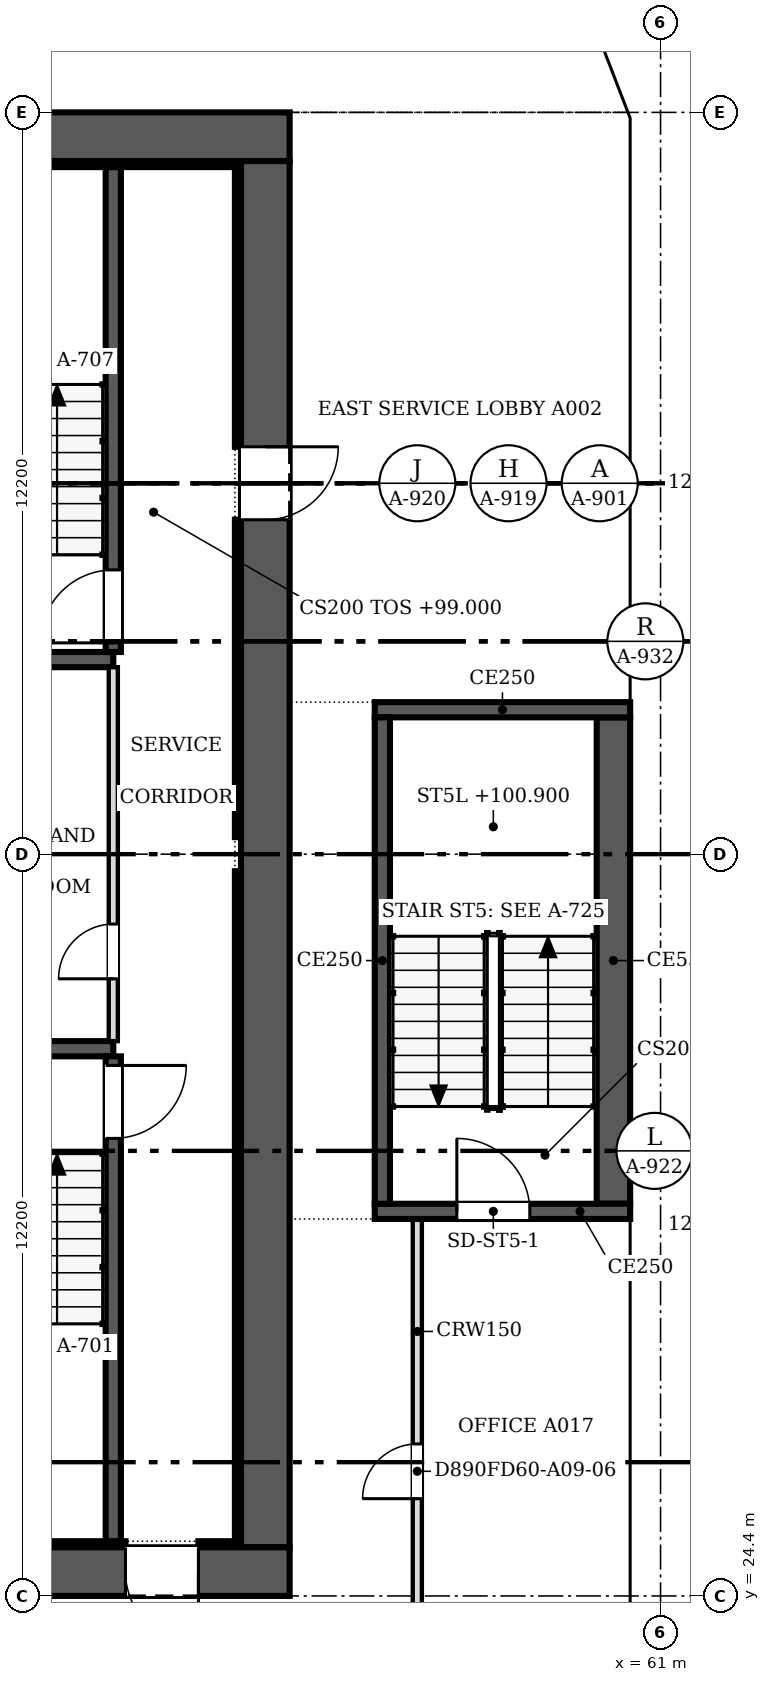
"""IFC4 building model, lengths in metres.
Left out: names, types, materials, properties, quantities, classifications, styles, units other than length and angle.
Written with IfcOpenShell. Run it as: python <this file> out.ifc"""

import sys

from ifc_helpers import new_model, si_unit, direction, frame, frame_2d, origin, place, context, subcontext, project, spatial, polyline, rectangle, outline, extrude, faceted_brep, source, transform, mapped, element, fill, save


model = new_model("IFC4")
c1 = context("Model", 3, precision=1e-05, world=origin(), true_north=direction((0.0, 1.0)))
c2 = subcontext(c1, "Body", "Model", "MODEL_VIEW")
j1 = project(units=[si_unit("LENGTHUNIT", "METRE"), si_unit("PLANEANGLEUNIT", "RADIAN")], contexts=[c1])
p1 = place(None, origin())
s1 = spatial("IfcSite", under=j1, at=p1, CompositionType="ELEMENT")
p2 = place(p1, origin())
s2 = spatial("IfcBuilding", under=s1, at=p2, CompositionType="ELEMENT")
p3 = place(p2, frame((0.0, 0.0, 99.0)))
s3 = spatial("IfcBuildingStorey", under=s2, at=p3, CompositionType="ELEMENT", Elevation=99.0)
m1 = source(origin(), c2, "Body", "Brep", [
    faceted_brep([(3.05, -0.25, 0.0), (6.1, -0.25, 3.8), (6.1, -0.25, 3.8), (3.05, -0.25, 7.6), (0.0, -0.25, 3.8), (0.0, 0.25, 3.8), (3.05, 0.25, 7.6), (6.1, 0.25, 3.8), (6.1, 0.25, 3.8), (3.05, 0.25, 0.0)], [[[0, 1, 2, 3, 4]], [[5, 6, 7, 8, 9]], [[9, 8, 1, 0]], [[7, 6, 3, 2]], [[6, 5, 4, 3]], [[5, 9, 0, 4]], [[1, 8, 7, 2]]]),
])
p4 = place(p3, frame((60.75, 18.3, -3.8), z_axis=(0.0, 0.0, 1.0), x_axis=(0.0, 1.0, 0.0)))
e1 = element("IfcWall", 1, at=p4, inside=s3, PredefinedType="SOLIDWALL", context=c2, shape_type="MappedRepresentation", body=[
    mapped(m1, transform((0.0, 0.0, 0.0), scale=1.0)),
])
m2 = source(origin(), c2, "Body", "SweptSolid", [
    extrude(outline(polyline([(3.05, 0.399), (5.78, 3.8), (3.05, 7.201), (0.321, 3.8), (3.05, 0.399)])), frame((0.0, 0.26, 0.0), z_axis=(0.0, -1.0, 0.0), x_axis=(1.0, 0.0, 0.0)), (0.0, 0.0, 1.0), 0.52),
])
p5 = place(p4, origin())
e2 = element("IfcOpeningElement", 2, at=p5, cuts=e1, PredefinedType="OPENING", context=c2, shape_type="MappedRepresentation", body=[
    mapped(m2, transform((0.0, 0.0, 0.0), scale=1.0)),
])
m3 = source(origin(), c2, "Body", "SweptSolid", [
    extrude(outline(polyline([(3.05, 0.0), (6.1, 3.8), (3.05, 7.6), (0.0, 3.8), (3.05, 0.0)])), frame((0.0, 0.25, 0.0), z_axis=(0.0, -1.0, 0.0), x_axis=(1.0, 0.0, 0.0)), (0.0, 0.0, 1.0), 0.5),
])
p6 = place(p3, frame((60.75, 24.4, -3.8), z_axis=(0.0, 0.0, 1.0), x_axis=(0.0, 1.0, 0.0)))
e3 = element("IfcWall", 3, at=p6, inside=s3, PredefinedType="SOLIDWALL", context=c2, shape_type="MappedRepresentation", body=[
    mapped(m3, transform((0.0, 0.0, 0.0), scale=1.0)),
])
p7 = place(p6, origin())
e4 = element("IfcOpeningElement", 4, at=p7, cuts=e3, PredefinedType="OPENING", context=c2, shape_type="MappedRepresentation", body=[
    mapped(m2, transform((0.0, 0.0, 0.0), scale=1.0)),
])
p8 = place(p3, frame((60.75, 30.5, -3.8), z_axis=(0.0, 0.0, 1.0), x_axis=(0.0, 1.0, 0.0)))
e5 = element("IfcWall", 5, at=p8, inside=s3, PredefinedType="SOLIDWALL", context=c2, shape_type="MappedRepresentation", body=[
    mapped(m3, transform((0.0, 0.0, 0.0), scale=1.0)),
])
p9 = place(p8, origin())
e6 = element("IfcOpeningElement", 6, at=p9, cuts=e5, PredefinedType="OPENING", context=c2, shape_type="MappedRepresentation", body=[
    mapped(m2, transform((0.0, 0.0, 0.0), scale=1.0)),
])
p10 = place(p3, frame((60.75, 36.6, -3.8), z_axis=(0.0, 0.0, 1.0), x_axis=(0.0, 1.0, 0.0)))
e7 = element("IfcWall", 7, at=p10, inside=s3, PredefinedType="SOLIDWALL", context=c2, shape_type="MappedRepresentation", body=[
    mapped(m1, transform((0.0, 0.0, 0.0), scale=1.0)),
])
p11 = place(p10, origin())
e8 = element("IfcOpeningElement", 8, at=p11, cuts=e7, PredefinedType="OPENING", context=c2, shape_type="MappedRepresentation", body=[
    mapped(m2, transform((0.0, 0.0, 0.0), scale=1.0)),
])
m4 = source(origin(), c2, "Body", "Brep", [
    faceted_brep([(3.05, -0.25, 0.0), (6.053, -0.25, 3.8), (3.05, -0.25, 7.6), (0.0, -0.25, 3.8), (0.0, 0.25, 3.8), (3.05, 0.25, 7.6), (6.007, 0.25, 3.859), (6.007, 0.25, 3.741), (3.05, 0.25, 0.0), (6.053, 0.0, 3.8)], [[[0, 1, 2, 3]], [[4, 5, 6, 7, 8]], [[8, 7, 9, 1, 0]], [[6, 5, 2, 1, 9]], [[5, 4, 3, 2]], [[4, 8, 0, 3]], [[9, 7, 6]]]),
])
p12 = place(p3, frame((60.75, 42.7, -3.8), z_axis=(0.0, 0.0, 1.0), x_axis=(0.0, 1.0, 0.0)))
e9 = element("IfcWall", 9, at=p12, inside=s3, PredefinedType="SOLIDWALL", context=c2, shape_type="MappedRepresentation", body=[
    mapped(m4, transform((0.0, 0.0, 0.0), scale=1.0)),
])
m5 = source(origin(), c2, "Body", "SweptSolid", [
    extrude(outline(polyline([(3.049, 0.401), (5.735, 3.8), (3.049, 7.199), (0.321, 3.8), (3.049, 0.401)])), frame((0.0, 0.26, 0.0), z_axis=(0.0, -1.0, 0.0), x_axis=(1.0, 0.0, 0.0)), (0.0, 0.0, 1.0), 0.52),
])
p13 = place(p12, origin())
e10 = element("IfcOpeningElement", 10, at=p13, cuts=e9, PredefinedType="OPENING", context=c2, shape_type="MappedRepresentation", body=[
    mapped(m5, transform((0.0, 0.0, 0.0), scale=1.0)),
])
m6 = source(origin(), c2, "Body", "Brep", [
    faceted_brep([(2.95, -0.25, 0.0), (3.003, -0.25, 0.068), (3.003, -0.25, 7.532), (2.95, -0.25, 7.6), (0.0, -0.25, 3.8), (0.047, 0.25, 3.86), (2.898, 0.25, 7.532), (2.898, 0.25, 0.068), (0.047, 0.25, 3.74), (2.95, 0.0, 0.0), (2.95, 0.0, 7.6), (0.0, 0.0, 3.8)], [[[0, 1, 2, 3, 4]], [[5, 6, 7, 8]], [[1, 0, 9]], [[10, 3, 2]], [[6, 5, 11, 4, 3, 10]], [[8, 7, 9, 0, 4, 11]], [[8, 11, 5]], [[1, 9, 7, 6, 10, 2]]]),
])
p14 = place(p3, frame((60.75, 48.753, -3.8), z_axis=(0.0, 0.0, 1.0), x_axis=(-0.35992665181, 0.932980602862, 0.0)))
e11 = element("IfcWall", 11, at=p14, inside=s3, PredefinedType="SOLIDWALL", context=c2, shape_type="MappedRepresentation", body=[
    mapped(m6, transform((0.0, 0.0, 0.0), scale=1.0)),
])
m7 = source(origin(), c2, "Body", "SweptSolid", [
    extrude(outline(polyline([(2.75, 6.935), (0.316, 3.8), (2.75, 0.665), (2.75, 6.935)])), frame((0.0, 0.26, 0.0), z_axis=(0.0, -1.0, 0.0), x_axis=(1.0, 0.0, 0.0)), (0.0, 0.0, 1.0), 0.52),
])
p15 = place(p14, origin())
e12 = element("IfcOpeningElement", 12, at=p15, cuts=e11, PredefinedType="OPENING", context=c2, shape_type="MappedRepresentation", body=[
    mapped(m7, transform((0.0, 0.0, 0.0), scale=1.0)),
])
p16 = place(p2, frame((0.0, 0.0, 102.8)))
s4 = spatial("IfcBuildingStorey", under=s2, at=p16, CompositionType="ELEMENT", Elevation=102.8)
p17 = place(p16, frame((60.75, 21.35, -3.8), z_axis=(0.0, 0.0, 1.0), x_axis=(0.0, 1.0, 0.0)))
e13 = element("IfcWall", 13, at=p17, inside=s4, PredefinedType="SOLIDWALL", context=c2, shape_type="MappedRepresentation", body=[
    mapped(m1, transform((0.0, 0.0, 0.0), scale=1.0)),
])
p18 = place(p17, origin())
e14 = element("IfcOpeningElement", 14, at=p18, cuts=e13, PredefinedType="OPENING", context=c2, shape_type="MappedRepresentation", body=[
    mapped(m2, transform((0.0, 0.0, 0.0), scale=1.0)),
])
p19 = place(p16, frame((60.75, 27.45, -3.8), z_axis=(0.0, 0.0, 1.0), x_axis=(0.0, 1.0, 0.0)))
e15 = element("IfcWall", 15, at=p19, inside=s4, PredefinedType="SOLIDWALL", context=c2, shape_type="MappedRepresentation", body=[
    mapped(m3, transform((0.0, 0.0, 0.0), scale=1.0)),
])
p20 = place(p19, origin())
e16 = element("IfcOpeningElement", 16, at=p20, cuts=e15, PredefinedType="OPENING", context=c2, shape_type="MappedRepresentation", body=[
    mapped(m2, transform((0.0, 0.0, 0.0), scale=1.0)),
])
p21 = place(p16, frame((60.75, 33.55, -3.8), z_axis=(0.0, 0.0, 1.0), x_axis=(0.0, 1.0, 0.0)))
e17 = element("IfcWall", 17, at=p21, inside=s4, PredefinedType="SOLIDWALL", context=c2, shape_type="MappedRepresentation", body=[
    mapped(m1, transform((0.0, 0.0, 0.0), scale=1.0)),
])
p22 = place(p21, origin())
e18 = element("IfcOpeningElement", 18, at=p22, cuts=e17, PredefinedType="OPENING", context=c2, shape_type="MappedRepresentation", body=[
    mapped(m2, transform((0.0, 0.0, 0.0), scale=1.0)),
])
p23 = place(p16, frame((60.75, 39.65, -3.8), z_axis=(0.0, 0.0, 1.0), x_axis=(0.0, 1.0, 0.0)))
e19 = element("IfcWall", 19, at=p23, inside=s4, PredefinedType="SOLIDWALL", context=c2, shape_type="MappedRepresentation", body=[
    mapped(m3, transform((0.0, 0.0, 0.0), scale=1.0)),
])
p24 = place(p23, origin())
e20 = element("IfcOpeningElement", 20, at=p24, cuts=e19, PredefinedType="OPENING", context=c2, shape_type="MappedRepresentation", body=[
    mapped(m2, transform((0.0, 0.0, 0.0), scale=1.0)),
])
m8 = source(origin(), c2, "Body", "Brep", [
    faceted_brep([(3.003, -0.25, 0.0), (3.05, -0.25, 0.06), (3.05, -0.25, 7.54), (3.003, -0.25, 7.6), (0.0, -0.25, 3.8), (0.0, 0.25, 3.8), (2.957, 0.25, 7.541), (2.957, 0.25, 0.059), (3.003, 0.0, 0.0), (3.003, 0.0, 7.6)], [[[0, 1, 2, 3, 4]], [[5, 6, 7]], [[1, 0, 8]], [[9, 3, 2]], [[6, 5, 4, 3, 9]], [[5, 7, 8, 0, 4]], [[1, 8, 7, 6, 9, 2]]]),
])
p25 = place(p16, frame((60.75, 45.75, -3.8), z_axis=(0.0, 0.0, 1.0), x_axis=(0.0, 1.0, 0.0)))
e21 = element("IfcWall", 21, at=p25, inside=s4, PredefinedType="SOLIDWALL", context=c2, shape_type="MappedRepresentation", body=[
    mapped(m8, transform((0.0, 0.0, 0.0), scale=1.0)),
])
m9 = source(origin(), c2, "Body", "SweptSolid", [
    extrude(outline(polyline([(2.803, 6.944), (0.319, 3.8), (2.803, 0.656), (2.803, 6.944)])), frame((0.0, 0.26, 0.0), z_axis=(0.0, -1.0, 0.0), x_axis=(1.0, 0.0, 0.0)), (0.0, 0.0, 1.0), 0.52),
])
p26 = place(p25, origin())
e22 = element("IfcOpeningElement", 22, at=p26, cuts=e21, PredefinedType="OPENING", context=c2, shape_type="MappedRepresentation", body=[
    mapped(m9, transform((0.0, 0.0, 0.0), scale=1.0)),
])
m10 = source(origin(), c2, "Body", "Brep", [
    faceted_brep([(0.047, -0.25, 0.0), (2.997, -0.25, 3.8), (0.047, -0.25, 7.6), (0.0, -0.25, 7.541), (0.0, -0.25, 0.059), (0.093, 0.25, 7.54), (2.944, 0.25, 3.868), (2.944, 0.25, 3.732), (0.093, 0.25, 0.06), (2.997, 0.0, 3.8), (0.047, 0.0, 0.0), (0.047, 0.0, 7.6)], [[[0, 1, 2, 3, 4]], [[5, 6, 7, 8]], [[8, 7, 9, 1, 0, 10]], [[6, 5, 11, 2, 1, 9]], [[3, 2, 11]], [[10, 0, 4]], [[8, 10, 4, 3, 11, 5]], [[9, 7, 6]]]),
])
p27 = place(p16, frame((60.767, 48.71, -3.8), z_axis=(0.0, 0.0, 1.0), x_axis=(-0.359901446078, 0.932990326376, 0.0)))
e23 = element("IfcWall", 23, at=p27, inside=s4, PredefinedType="SOLIDWALL", context=c2, shape_type="MappedRepresentation", body=[
    mapped(m10, transform((0.0, 0.0, 0.0), scale=1.0)),
])
m11 = source(origin(), c2, "Body", "SweptSolid", [
    extrude(outline(polyline([(0.247, 0.665), (2.681, 3.8), (0.247, 6.935), (0.247, 0.665)])), frame((0.0, 0.26, 0.0), z_axis=(0.0, -1.0, 0.0), x_axis=(1.0, 0.0, 0.0)), (0.0, 0.0, 1.0), 0.52),
])
p28 = place(p27, origin())
e24 = element("IfcOpeningElement", 24, at=p28, cuts=e23, PredefinedType="OPENING", context=c2, shape_type="MappedRepresentation", body=[
    mapped(m11, transform((0.0, 0.0, 0.0), scale=1.0)),
])
p29 = place(p3, frame((54.9, 24.8, 0.0), z_axis=(0.0, 0.0, 1.0), x_axis=(-1.0, 0.0, 0.0)))
e25 = element("IfcWall", 25, at=p29, inside=s3, PredefinedType="SHEAR", context=c2, shape_type="SweptSolid", body=[
    extrude(rectangle(XDim=24.4, YDim=0.8, at=frame_2d((12.2, 0.0))), origin(), (0.0, 0.0, 1.0), 3.8),
])
m12 = source(origin(), c2, "Body", "SweptSolid", [
    extrude(rectangle(XDim=1.2, YDim=2.1, at=frame_2d((0.6, 1.05))), frame((0.0, 0.41, 0.0), z_axis=(0.0, -1.0, 0.0), x_axis=(1.0, 0.0, 0.0)), (0.0, 0.0, 1.0), 0.82),
])
p30 = place(p29, frame((1.5, 0.0, 0.0)))
e26 = element("IfcOpeningElement", 26, at=p30, cuts=e25, PredefinedType="OPENING", context=c2, shape_type="MappedRepresentation", body=[
    mapped(m12, transform((0.0, 0.0, 0.0), scale=1.0)),
])
p31 = place(p3, frame((30.5, 48.4, 0.0), z_axis=(0.0, 0.0, 1.0), x_axis=(1.0, 0.0, 0.0)))
e27 = element("IfcWall", 27, at=p31, inside=s3, PredefinedType="SHEAR", context=c2, shape_type="SweptSolid", body=[
    extrude(rectangle(XDim=24.4, YDim=0.8, at=frame_2d((12.2, 0.0))), origin(), (0.0, 0.0, 1.0), 3.8),
])
p32 = place(p3, frame((54.5, 48.0, 0.0), z_axis=(0.0, 0.0, 1.0), x_axis=(0.0, -1.0, 0.0)))
e28 = element("IfcWall", 28, at=p32, inside=s3, PredefinedType="SHEAR", context=c2, shape_type="SweptSolid", body=[
    extrude(rectangle(XDim=22.8, YDim=0.8, at=frame_2d((11.4, 0.0))), origin(), (0.0, 0.0, 1.0), 3.8),
])
p33 = place(p32, frame((4.7, 0.0, 0.0)))
e29 = element("IfcOpeningElement", 29, at=p33, cuts=e28, PredefinedType="OPENING", context=c2, shape_type="MappedRepresentation", body=[
    mapped(m12, transform((0.0, 0.0, 0.0), scale=1.0)),
])
p34 = place(p3, frame((31.3, 25.25, 0.0), z_axis=(0.0, 0.0, 1.0), x_axis=(1.0, 0.0, 0.0)))
e30 = element("IfcWall", 30, at=p34, inside=s3, PredefinedType="SOLIDWALL", context=c2, shape_type="SweptSolid", body=[
    extrude(rectangle(XDim=20.9, YDim=0.1, at=frame_2d((10.45, 0.0))), origin(), (0.0, 0.0, 1.0), 3.8),
])
p35 = place(p3, frame((53.4, 25.25, 0.0), z_axis=(0.0, 0.0, 1.0), x_axis=(1.0, 0.0, 0.0)))
e31 = element("IfcWall", 31, at=p35, inside=s3, PredefinedType="SOLIDWALL", context=c2, shape_type="SweptSolid", body=[
    extrude(rectangle(XDim=0.7, YDim=0.1, at=frame_2d((0.35, 0.0))), origin(), (0.0, 0.0, 1.0), 3.8),
])
p36 = place(p3, frame((31.3, 47.95, 0.0), z_axis=(0.0, 0.0, 1.0), x_axis=(1.0, 0.0, 0.0)))
e32 = element("IfcWall", 32, at=p36, inside=s3, PredefinedType="SOLIDWALL", context=c2, shape_type="SweptSolid", body=[
    extrude(rectangle(XDim=22.8, YDim=0.1, at=frame_2d((11.4, 0.0))), origin(), (0.0, 0.0, 1.0), 3.8),
])
p37 = place(p3, frame((54.05, 25.3, 0.0), z_axis=(0.0, 0.0, 1.0), x_axis=(0.0, 1.0, 0.0)))
e33 = element("IfcWall", 33, at=p37, inside=s3, PredefinedType="SOLIDWALL", context=c2, shape_type="SweptSolid", body=[
    extrude(rectangle(XDim=11.02, YDim=0.1, at=frame_2d((5.51, 0.0))), origin(), (0.0, 0.0, 1.0), 3.8),
])
p38 = place(p3, frame((54.05, 36.88, 0.0), z_axis=(0.0, 0.0, 1.0), x_axis=(0.0, 1.0, 0.0)))
e34 = element("IfcWall", 34, at=p38, inside=s3, PredefinedType="SOLIDWALL", context=c2, shape_type="SweptSolid", body=[
    extrude(rectangle(XDim=5.22, YDim=0.1, at=frame_2d((2.61, 0.0))), origin(), (0.0, 0.0, 1.0), 3.8),
])
p39 = place(p3, frame((54.05, 43.3, 0.0), z_axis=(0.0, 0.0, 1.0), x_axis=(0.0, 1.0, 0.0)))
e35 = element("IfcWall", 35, at=p39, inside=s3, PredefinedType="SOLIDWALL", context=c2, shape_type="SweptSolid", body=[
    extrude(rectangle(XDim=4.6, YDim=0.1, at=frame_2d((2.3, 0.0))), origin(), (0.0, 0.0, 1.0), 3.8),
])
for number, where, z_axis, x_axis in (
    (36, (48.475, 33.4, 0.0), (0.0, 0.0, 1.0), (1.0, 0.0, 0.0)),
    (37, (48.475, 39.8, 0.0), (0.0, 0.0, 1.0), (1.0, 0.0, 0.0)),
):
    element("IfcWall", number, at=place(p3, frame(where, z_axis=z_axis, x_axis=x_axis)), inside=s3, PredefinedType="SOLIDWALL", context=c2, shape_type="SweptSolid", body=[
        extrude(rectangle(XDim=3.525, YDim=0.25, at=frame_2d((1.762, 0.0))), origin(), (0.0, 0.0, 1.0), 3.8),
    ])
p40 = place(p3, frame((52.0, 25.3, 0.0), z_axis=(0.0, 0.0, 1.0), x_axis=(0.0, 1.0, 0.0)))
e38 = element("IfcWall", 38, at=p40, inside=s3, PredefinedType="SOLIDWALL", context=c2, shape_type="SweptSolid", body=[
    extrude(rectangle(XDim=7.975, YDim=0.25, at=frame_2d((3.987, 0.0))), origin(), (0.0, 0.0, 1.0), 3.8),
])
m13 = source(origin(), c2, "Body", "SweptSolid", [
    extrude(rectangle(XDim=1.2, YDim=2.1, at=frame_2d((0.6, 1.05))), frame((0.0, 0.135, 0.0), z_axis=(0.0, -1.0, 0.0), x_axis=(1.0, 0.0, 0.0)), (0.0, 0.0, 1.0), 0.27),
])
p41 = place(p40, frame((6.625, 0.0, 0.0)))
e39 = element("IfcOpeningElement", 39, at=p41, cuts=e38, PredefinedType="OPENING", context=c2, shape_type="MappedRepresentation", body=[
    mapped(m13, transform((0.0, 0.0, 0.0), scale=1.0)),
])
p42 = place(p3, frame((52.0, 39.925, 0.0), z_axis=(0.0, 0.0, 1.0), x_axis=(0.0, 1.0, 0.0)))
e40 = element("IfcWall", 40, at=p42, inside=s3, PredefinedType="SOLIDWALL", context=c2, shape_type="SweptSolid", body=[
    extrude(rectangle(XDim=7.975, YDim=0.25, at=frame_2d((3.987, 0.0))), origin(), (0.0, 0.0, 1.0), 3.8),
])
p43 = place(p42, frame((0.15, 0.0, 0.0)))
e41 = element("IfcOpeningElement", 41, at=p43, cuts=e40, PredefinedType="OPENING", context=c2, shape_type="MappedRepresentation", body=[
    mapped(m13, transform((0.0, 0.0, 0.0), scale=1.0)),
])
p44 = place(p3, frame((52.0, 33.525, 0.0), z_axis=(0.0, 0.0, 1.0), x_axis=(0.0, 1.0, 0.0)))
e42 = element("IfcWall", 42, at=p44, inside=s3, PredefinedType="PARTITIONING", context=c2, shape_type="SweptSolid", body=[
    extrude(rectangle(XDim=6.15, YDim=0.15, at=frame_2d((3.075, 0.0))), origin(), (0.0, 0.0, 1.0), 3.6),
])
m14 = source(origin(), c2, "Body", "SweptSolid", [
    extrude(rectangle(XDim=0.9, YDim=2.1, at=frame_2d((0.45, 1.05))), frame((0.0, 0.085, 0.0), z_axis=(0.0, -1.0, 0.0), x_axis=(1.0, 0.0, 0.0)), (0.0, 0.0, 1.0), 0.17),
])
p45 = place(p44, frame((1.025, 0.0, 0.0)))
e43 = element("IfcOpeningElement", 43, at=p45, cuts=e42, PredefinedType="OPENING", context=c2, shape_type="MappedRepresentation", body=[
    mapped(m14, transform((0.0, 0.0, 0.0), scale=1.0)),
])
p46 = place(p3, frame((60.5, 30.725, 0.0), z_axis=(0.0, 0.0, 1.0), x_axis=(-1.0, 0.0, 0.0)))
e44 = element("IfcWall", 44, at=p46, inside=s3, PredefinedType="SOLIDWALL", context=c2, shape_type="SweptSolid", body=[
    extrude(rectangle(XDim=4.2, YDim=0.25, at=frame_2d((2.1, 0.0))), origin(), (0.0, 0.0, 1.0), 3.8),
])
p47 = place(p46, frame((1.65, 0.0, 0.0)))
e45 = element("IfcOpeningElement", 45, at=p47, cuts=e44, PredefinedType="OPENING", context=c2, shape_type="MappedRepresentation", body=[
    mapped(m13, transform((0.0, 0.0, 0.0), scale=1.0)),
])
p48 = place(p3, frame((56.425, 30.85, 0.0), z_axis=(0.0, 0.0, 1.0), x_axis=(0.0, 1.0, 0.0)))
e46 = element("IfcWall", 46, at=p48, inside=s3, PredefinedType="SOLIDWALL", context=c2, shape_type="SweptSolid", body=[
    extrude(rectangle(XDim=8.0, YDim=0.25, at=frame_2d((4.0, 0.0))), origin(), (0.0, 0.0, 1.0), 3.8),
])
p49 = place(p3, frame((56.3, 38.975, 0.0), z_axis=(0.0, 0.0, 1.0), x_axis=(1.0, 0.0, 0.0)))
e47 = element("IfcWall", 47, at=p49, inside=s3, PredefinedType="SOLIDWALL", context=c2, shape_type="SweptSolid", body=[
    extrude(rectangle(XDim=4.2, YDim=0.25, at=frame_2d((2.1, 0.0))), origin(), (0.0, 0.0, 1.0), 3.8),
])
p50 = place(p3, frame((60.225, 38.85, 0.0), z_axis=(0.0, 0.0, 1.0), x_axis=(0.0, -1.0, 0.0)))
e48 = element("IfcWall", 48, at=p50, inside=s3, PredefinedType="SOLIDWALL", context=c2, shape_type="SweptSolid", body=[
    extrude(rectangle(XDim=8.0, YDim=0.55, at=frame_2d((4.0, 0.0))), origin(), (0.0, 0.0, 1.0), 3.8),
])
p51 = place(p3, frame((57.0, 30.6, 0.0), z_axis=(0.0, 0.0, 1.0), x_axis=(0.0, -1.0, 0.0)))
e49 = element("IfcWall", 49, at=p51, inside=s3, PredefinedType="PARTITIONING", context=c2, shape_type="SweptSolid", body=[
    extrude(rectangle(XDim=8.3, YDim=0.15, at=frame_2d((4.15, 0.0))), origin(), (0.0, 0.0, 1.0), 3.067),
])
p52 = place(p51, frame((3.7, 0.0, 0.0)))
e50 = element("IfcOpeningElement", 50, at=p52, cuts=e49, PredefinedType="OPENING", context=c2, shape_type="MappedRepresentation", body=[
    mapped(m14, transform((0.0, 0.0, 0.0), scale=1.0)),
])
m15 = source(origin(), c2, "Body", "SweptSolid", [
    extrude(rectangle(XDim=1.2, YDim=2.1, at=frame_2d((0.6, 1.05))), frame((0.0, 0.025, 0.0), z_axis=(0.0, -1.0, 0.0), x_axis=(1.0, 0.0, 0.0)), (0.0, 0.0, 1.0), 0.05),
])
p53 = place(p30, origin())
e51 = element("IfcDoor", 51, at=p53, inside=s3, OperationType="SINGLE_SWING_LEFT", PredefinedType="DOOR", context=c2, shape_type="MappedRepresentation", body=[
    mapped(m15, transform((0.0, 0.0, 0.0), scale=1.0)),
])
fill(e26, e51)
p54 = place(p33, origin())
e52 = element("IfcDoor", 52, at=p54, inside=s3, OperationType="SINGLE_SWING_LEFT", PredefinedType="DOOR", context=c2, shape_type="MappedRepresentation", body=[
    mapped(m15, transform((0.0, 0.0, 0.0), scale=1.0)),
])
fill(e29, e52)
p55 = place(p41, origin())
e53 = element("IfcDoor", 53, at=p55, inside=s3, OperationType="SINGLE_SWING_RIGHT", PredefinedType="DOOR", context=c2, shape_type="MappedRepresentation", body=[
    mapped(m15, transform((0.0, 0.0, 0.0), scale=1.0)),
])
fill(e39, e53)
p56 = place(p43, origin())
e54 = element("IfcDoor", 54, at=p56, inside=s3, OperationType="SINGLE_SWING_LEFT", PredefinedType="DOOR", context=c2, shape_type="MappedRepresentation", body=[
    mapped(m15, transform((0.0, 0.0, 0.0), scale=1.0)),
])
fill(e41, e54)
m16 = source(origin(), c2, "Body", "SweptSolid", [
    extrude(rectangle(XDim=0.9, YDim=2.1, at=frame_2d((0.45, 1.05))), frame((0.0, 0.025, 0.0), z_axis=(0.0, -1.0, 0.0), x_axis=(1.0, 0.0, 0.0)), (0.0, 0.0, 1.0), 0.05),
])
p57 = place(p45, origin())
e55 = element("IfcDoor", 55, at=p57, inside=s3, OperationType="SINGLE_SWING_LEFT", PredefinedType="DOOR", context=c2, shape_type="MappedRepresentation", body=[
    mapped(m16, transform((0.0, 0.0, 0.0), scale=1.0)),
])
fill(e43, e55)
p58 = place(p47, origin())
e56 = element("IfcDoor", 56, at=p58, inside=s3, OperationType="SINGLE_SWING_RIGHT", PredefinedType="DOOR", context=c2, shape_type="MappedRepresentation", body=[
    mapped(m15, transform((0.0, 0.0, 0.0), scale=1.0)),
])
fill(e45, e56)
p59 = place(p52, origin())
e57 = element("IfcDoor", 57, at=p59, inside=s3, OperationType="SINGLE_SWING_RIGHT", PredefinedType="DOOR", context=c2, shape_type="MappedRepresentation", body=[
    mapped(m16, transform((0.0, 0.0, 0.0), scale=1.0)),
])
fill(e50, e57)
save(model, sys.argv[1])
